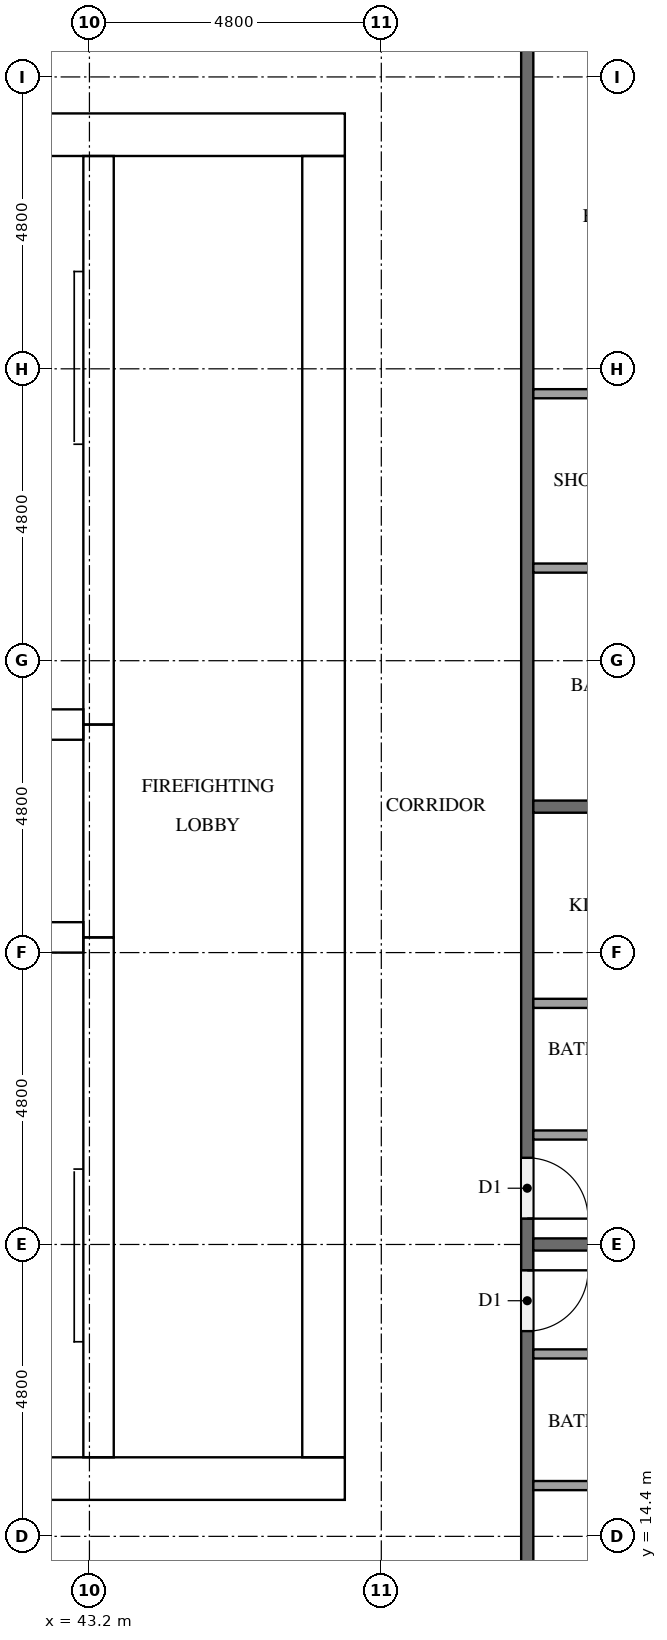
"""IFC4 building model, lengths in metres.
Left out: names, types, materials, properties, quantities, classifications, styles, units other than length and angle.
Written with IfcOpenShell. Run it as: python <this file> out.ifc"""

import sys

from ifc_helpers import new_model, si_unit, direction, frame, frame_2d, origin, place, context, subcontext, project, spatial, rectangle, extrude, element, fill, save


model = new_model("IFC4")
c1 = context("Model", 3, precision=1e-05, world=origin(), true_north=direction((0.0, 1.0)))
c2 = subcontext(c1, "Body", "Model", "MODEL_VIEW")
j1 = project(units=[si_unit("LENGTHUNIT", "METRE"), si_unit("PLANEANGLEUNIT", "RADIAN")], contexts=[c1])
p1 = place(None, origin())
s1 = spatial("IfcSite", under=j1, at=p1, CompositionType="ELEMENT")
p2 = place(p1, origin())
s2 = spatial("IfcBuilding", under=s1, at=p2, CompositionType="ELEMENT")
p3 = place(p2, frame((0.0, 0.0, 192.9)))
s3 = spatial("IfcBuildingStorey", under=s2, at=p3, CompositionType="ELEMENT", Elevation=192.9)
p4 = place(p3, frame((15.0, 15.35, 0.0), z_axis=(0.0, 0.0, 1.0), x_axis=(1.0, 0.0, 0.0)))
e1 = element("IfcWall", 1, at=p4, inside=s3, PredefinedType="SHEAR", context=c2, shape_type="SweptSolid", body=[
    extrude(rectangle(XDim=32.4, YDim=0.7, at=frame_2d((16.2, 0.0))), origin(), (0.0, 0.0, 1.0), 3.2),
])
p5 = place(p4, frame((15.3, 0.0, 0.0)))
e2 = element("IfcOpeningElement", 2, at=p5, cuts=e1, PredefinedType="OPENING", context=c2, shape_type="SweptSolid", body=[
    extrude(rectangle(XDim=1.8, YDim=2.1, at=frame_2d((0.9, 1.05))), frame((0.0, 0.36, 0.0), z_axis=(0.0, -1.0, 0.0), x_axis=(1.0, 0.0, 0.0)), (0.0, 0.0, 1.0), 0.72),
])
p6 = place(p3, frame((15.0, 37.45, 0.0), z_axis=(0.0, 0.0, 1.0), x_axis=(1.0, 0.0, 0.0)))
e3 = element("IfcWall", 3, at=p6, inside=s3, PredefinedType="SHEAR", context=c2, shape_type="SweptSolid", body=[
    extrude(rectangle(XDim=32.4, YDim=0.7, at=frame_2d((16.2, 0.0))), origin(), (0.0, 0.0, 1.0), 3.2),
])
p7 = place(p6, frame((15.3, 0.0, 0.0)))
e4 = element("IfcOpeningElement", 4, at=p7, cuts=e3, PredefinedType="OPENING", context=c2, shape_type="SweptSolid", body=[
    extrude(rectangle(XDim=1.8, YDim=2.1, at=frame_2d((0.9, 1.05))), frame((0.0, 0.36, 0.0), z_axis=(0.0, -1.0, 0.0), x_axis=(1.0, 0.0, 0.0)), (0.0, 0.0, 1.0), 0.72),
])
p8 = place(p6, frame((1.544, 0.0, 0.0)))
e5 = element("IfcOpeningElement", 5, at=p8, cuts=e3, PredefinedType="OPENING", context=c2, shape_type="SweptSolid", body=[
    extrude(rectangle(XDim=1.0, YDim=2.1, at=frame_2d((0.5, 1.05))), frame((0.0, 0.36, 0.0), z_axis=(0.0, -1.0, 0.0), x_axis=(1.0, 0.0, 0.0)), (0.0, 0.0, 1.0), 0.72),
])
p9 = place(p6, frame((5.219, 0.0, 0.0)))
e6 = element("IfcOpeningElement", 6, at=p9, cuts=e3, PredefinedType="OPENING", context=c2, shape_type="SweptSolid", body=[
    extrude(rectangle(XDim=1.0, YDim=2.1, at=frame_2d((0.5, 1.05))), frame((0.0, 0.36, 0.0), z_axis=(0.0, -1.0, 0.0), x_axis=(1.0, 0.0, 0.0)), (0.0, 0.0, 1.0), 0.72),
])
p10 = place(p3, frame((47.05, 15.7, 0.0), z_axis=(0.0, 0.0, 1.0), x_axis=(0.0, 1.0, 0.0)))
e7 = element("IfcWall", 7, at=p10, inside=s3, PredefinedType="SHEAR", context=c2, shape_type="SweptSolid", body=[
    extrude(rectangle(XDim=21.4, YDim=0.7, at=frame_2d((10.7, 0.0))), origin(), (0.0, 0.0, 1.0), 3.2),
])
p11 = place(p10, frame((10.4, 0.0, 0.0)))
e8 = element("IfcOpeningElement", 8, at=p11, cuts=e7, PredefinedType="OPENING", context=c2, shape_type="SweptSolid", body=[
    extrude(rectangle(XDim=1.2, YDim=2.1, at=frame_2d((0.6, 1.05))), frame((0.0, 0.36, 0.0), z_axis=(0.0, -1.0, 0.0), x_axis=(1.0, 0.0, 0.0)), (0.0, 0.0, 1.0), 0.72),
])
p12 = place(p3, frame((43.35, 15.7, 0.0), z_axis=(0.0, 0.0, 1.0), x_axis=(0.0, 1.0, 0.0)))
e9 = element("IfcWall", 9, at=p12, inside=s3, PredefinedType="SHEAR", context=c2, shape_type="SweptSolid", body=[
    extrude(rectangle(XDim=8.55, YDim=0.5, at=frame_2d((4.275, 0.0))), origin(), (0.0, 0.0, 1.0), 3.2),
])
p13 = place(p12, frame((0.5, 0.0, 0.0)))
e10 = element("IfcOpeningElement", 10, at=p13, cuts=e9, PredefinedType="OPENING", context=c2, shape_type="SweptSolid", body=[
    extrude(rectangle(XDim=1.2, YDim=2.1, at=frame_2d((0.6, 1.05))), frame((0.0, 0.26, 0.0), z_axis=(0.0, -1.0, 0.0), x_axis=(1.0, 0.0, 0.0)), (0.0, 0.0, 1.0), 0.52),
])
p14 = place(p3, frame((43.35, 24.25, 0.0), z_axis=(0.0, 0.0, 1.0), x_axis=(0.0, 1.0, 0.0)))
e11 = element("IfcWall", 11, at=p14, inside=s3, PredefinedType="SHEAR", context=c2, shape_type="SweptSolid", body=[
    extrude(rectangle(XDim=3.5, YDim=0.5, at=frame_2d((1.75, 0.0))), origin(), (0.0, 0.0, 1.0), 3.2),
])
p15 = place(p14, frame((1.2, 0.0, 0.0)))
e12 = element("IfcOpeningElement", 12, at=p15, cuts=e11, PredefinedType="OPENING", context=c2, shape_type="SweptSolid", body=[
    extrude(rectangle(XDim=1.1, YDim=2.1, at=frame_2d((0.55, 1.05))), frame((0.0, 0.26, 0.0), z_axis=(0.0, -1.0, 0.0), x_axis=(1.0, 0.0, 0.0)), (0.0, 0.0, 1.0), 0.52),
])
p16 = place(p3, frame((43.35, 27.75, 0.0), z_axis=(0.0, 0.0, 1.0), x_axis=(0.0, 1.0, 0.0)))
e13 = element("IfcWall", 13, at=p16, inside=s3, PredefinedType="SHEAR", context=c2, shape_type="SweptSolid", body=[
    extrude(rectangle(XDim=9.35, YDim=0.5, at=frame_2d((4.675, 0.0))), origin(), (0.0, 0.0, 1.0), 3.2),
])
p17 = place(p16, frame((7.65, 0.0, 0.0)))
e14 = element("IfcOpeningElement", 14, at=p17, cuts=e13, PredefinedType="OPENING", context=c2, shape_type="SweptSolid", body=[
    extrude(rectangle(XDim=1.2, YDim=2.1, at=frame_2d((0.6, 1.05))), frame((0.0, 0.26, 0.0), z_axis=(0.0, -1.0, 0.0), x_axis=(1.0, 0.0, 0.0)), (0.0, 0.0, 1.0), 0.52),
])
for number, where, z_axis, x_axis in (
    (15, (39.55, 24.25, 0.0), (0.0, 0.0, 1.0), (1.0, 0.0, 0.0)),
    (16, (39.55, 27.75, 0.0), (0.0, 0.0, 1.0), (1.0, 0.0, 0.0)),
):
    element("IfcWall", number, at=place(p3, frame(where, z_axis=z_axis, x_axis=x_axis)), inside=s3, PredefinedType="SHEAR", context=c2, shape_type="SweptSolid", body=[
        extrude(rectangle(XDim=3.55, YDim=0.5, at=frame_2d((1.775, 0.0))), origin(), (0.0, 0.0, 1.0), 3.2),
    ])
p18 = place(p3, frame((50.4, 40.7, 0.0), z_axis=(0.0, 0.0, 1.0), x_axis=(0.0, -1.0, 0.0)))
e17 = element("IfcWall", 17, at=p18, inside=s3, PredefinedType="PARTITIONING", context=c2, shape_type="SweptSolid", body=[
    extrude(rectangle(XDim=28.6, YDim=0.2, at=frame_2d((14.3, 0.0))), origin(), (0.0, 0.0, 1.0), 3.2),
])
p19 = place(p18, frame((21.925, 0.0, 0.0)))
e18 = element("IfcOpeningElement", 18, at=p19, cuts=e17, PredefinedType="OPENING", context=c2, shape_type="SweptSolid", body=[
    extrude(rectangle(XDim=1.0, YDim=2.1, at=frame_2d((0.5, 1.05))), frame((0.0, 0.11, 0.0), z_axis=(0.0, -1.0, 0.0), x_axis=(1.0, 0.0, 0.0)), (0.0, 0.0, 1.0), 0.22),
])
p20 = place(p18, frame((20.075, 0.0, 0.0)))
e19 = element("IfcOpeningElement", 19, at=p20, cuts=e17, PredefinedType="OPENING", context=c2, shape_type="SweptSolid", body=[
    extrude(rectangle(XDim=1.0, YDim=2.1, at=frame_2d((0.5, 1.05))), frame((0.0, 0.11, 0.0), z_axis=(0.0, -1.0, 0.0), x_axis=(1.0, 0.0, 0.0)), (0.0, 0.0, 1.0), 0.22),
])
p21 = place(p18, frame((0.325, 0.0, 0.0)))
e20 = element("IfcOpeningElement", 20, at=p21, cuts=e17, PredefinedType="OPENING", context=c2, shape_type="SweptSolid", body=[
    extrude(rectangle(XDim=1.0, YDim=2.1, at=frame_2d((0.5, 1.05))), frame((0.0, 0.11, 0.0), z_axis=(0.0, -1.0, 0.0), x_axis=(1.0, 0.0, 0.0)), (0.0, 0.0, 1.0), 0.22),
])
for number, where, z_axis, x_axis in (
    (21, (50.5, 19.2, 0.0), (0.0, 0.0, 1.0), (1.0, 0.0, 0.0)),
    (22, (50.5, 26.4, 0.0), (0.0, 0.0, 1.0), (1.0, 0.0, 0.0)),
):
    element("IfcWall", number, at=place(p3, frame(where, z_axis=z_axis, x_axis=x_axis)), inside=s3, PredefinedType="PARTITIONING", context=c2, shape_type="SweptSolid", body=[
        extrude(rectangle(XDim=11.8, YDim=0.2, at=frame_2d((5.9, 0.0))), origin(), (0.0, 0.0, 1.0), 3.2),
    ])
p22 = place(p3, frame((50.5, 15.235, 0.0), z_axis=(0.0, 0.0, 1.0), x_axis=(1.0, 0.0, 0.0)))
e23 = element("IfcWall", 23, at=p22, inside=s3, PredefinedType="PARTITIONING", context=c2, shape_type="SweptSolid", body=[
    extrude(rectangle(XDim=3.875, YDim=0.15, at=frame_2d((1.938, 0.0))), origin(), (0.0, 0.0, 1.0), 3.2),
])
p23 = place(p3, frame((50.5, 17.4, 0.0), z_axis=(0.0, 0.0, 1.0), x_axis=(1.0, 0.0, 0.0)))
e24 = element("IfcWall", 24, at=p23, inside=s3, PredefinedType="PARTITIONING", context=c2, shape_type="SweptSolid", body=[
    extrude(rectangle(XDim=4.025, YDim=0.15, at=frame_2d((2.012, 0.0))), origin(), (0.0, 0.0, 1.0), 3.2),
])
p24 = place(p3, frame((50.5, 23.165, 0.0), z_axis=(0.0, 0.0, 1.0), x_axis=(1.0, 0.0, 0.0)))
e25 = element("IfcWall", 25, at=p24, inside=s3, PredefinedType="PARTITIONING", context=c2, shape_type="SweptSolid", body=[
    extrude(rectangle(XDim=3.275, YDim=0.15, at=frame_2d((1.637, 0.0))), origin(), (0.0, 0.0, 1.0), 3.2),
])
p25 = place(p3, frame((50.5, 21.0, 0.0), z_axis=(0.0, 0.0, 1.0), x_axis=(1.0, 0.0, 0.0)))
e26 = element("IfcWall", 26, at=p25, inside=s3, PredefinedType="PARTITIONING", context=c2, shape_type="SweptSolid", body=[
    extrude(rectangle(XDim=3.425, YDim=0.15, at=frame_2d((1.712, 0.0))), origin(), (0.0, 0.0, 1.0), 3.2),
])
for number, where, z_axis, x_axis in (
    (27, (50.5, 33.19, 0.0), (0.0, 0.0, 1.0), (1.0, 0.0, 0.0)),
    (28, (50.5, 30.323, 0.0), (0.0, 0.0, 1.0), (1.0, 0.0, 0.0)),
):
    element("IfcWall", number, at=place(p3, frame(where, z_axis=z_axis, x_axis=x_axis)), inside=s3, PredefinedType="PARTITIONING", context=c2, shape_type="SweptSolid", body=[
        extrude(rectangle(XDim=3.725, YDim=0.15, at=frame_2d((1.863, 0.0))), origin(), (0.0, 0.0, 1.0), 3.2),
    ])
p26 = place(p15, origin())
e29 = element("IfcDoor", 29, at=p26, inside=s3, OperationType="DOUBLE_DOOR_SLIDING", PredefinedType="DOOR", context=c2, shape_type="SweptSolid", body=[
    extrude(rectangle(XDim=1.1, YDim=2.1, at=frame_2d((0.55, 1.05))), frame((0.0, 0.025, 0.0), z_axis=(0.0, -1.0, 0.0), x_axis=(1.0, 0.0, 0.0)), (0.0, 0.0, 1.0), 0.05),
])
fill(e12, e29)
p27 = place(p13, origin())
e30 = element("IfcDoor", 30, at=p27, inside=s3, OperationType="SINGLE_SWING_LEFT", PredefinedType="DOOR", context=c2, shape_type="SweptSolid", body=[
    extrude(rectangle(XDim=1.2, YDim=2.1, at=frame_2d((0.6, 1.05))), frame((0.0, 0.025, 0.0), z_axis=(0.0, -1.0, 0.0), x_axis=(1.0, 0.0, 0.0)), (0.0, 0.0, 1.0), 0.05),
])
fill(e10, e30)
p28 = place(p17, origin())
e31 = element("IfcDoor", 31, at=p28, inside=s3, OperationType="SINGLE_SWING_RIGHT", PredefinedType="DOOR", context=c2, shape_type="SweptSolid", body=[
    extrude(rectangle(XDim=1.2, YDim=2.1, at=frame_2d((0.6, 1.05))), frame((0.0, 0.025, 0.0), z_axis=(0.0, -1.0, 0.0), x_axis=(1.0, 0.0, 0.0)), (0.0, 0.0, 1.0), 0.05),
])
fill(e14, e31)
p29 = place(p11, origin())
e32 = element("IfcDoor", 32, at=p29, inside=s3, OperationType="SINGLE_SWING_RIGHT", PredefinedType="DOOR", context=c2, shape_type="SweptSolid", body=[
    extrude(rectangle(XDim=1.2, YDim=2.1, at=frame_2d((0.6, 1.05))), frame((0.0, 0.025, 0.0), z_axis=(0.0, -1.0, 0.0), x_axis=(1.0, 0.0, 0.0)), (0.0, 0.0, 1.0), 0.05),
])
fill(e8, e32)
p30 = place(p19, origin())
e33 = element("IfcDoor", 33, at=p30, inside=s3, OperationType="SINGLE_SWING_LEFT", PredefinedType="DOOR", context=c2, shape_type="SweptSolid", body=[
    extrude(rectangle(XDim=1.0, YDim=2.1, at=frame_2d((0.5, 1.05))), frame((0.0, 0.025, 0.0), z_axis=(0.0, -1.0, 0.0), x_axis=(1.0, 0.0, 0.0)), (0.0, 0.0, 1.0), 0.05),
])
fill(e18, e33)
p31 = place(p20, origin())
e34 = element("IfcDoor", 34, at=p31, inside=s3, OperationType="SINGLE_SWING_RIGHT", PredefinedType="DOOR", context=c2, shape_type="SweptSolid", body=[
    extrude(rectangle(XDim=1.0, YDim=2.1, at=frame_2d((0.5, 1.05))), frame((0.0, 0.025, 0.0), z_axis=(0.0, -1.0, 0.0), x_axis=(1.0, 0.0, 0.0)), (0.0, 0.0, 1.0), 0.05),
])
fill(e19, e34)
save(model, sys.argv[1])
